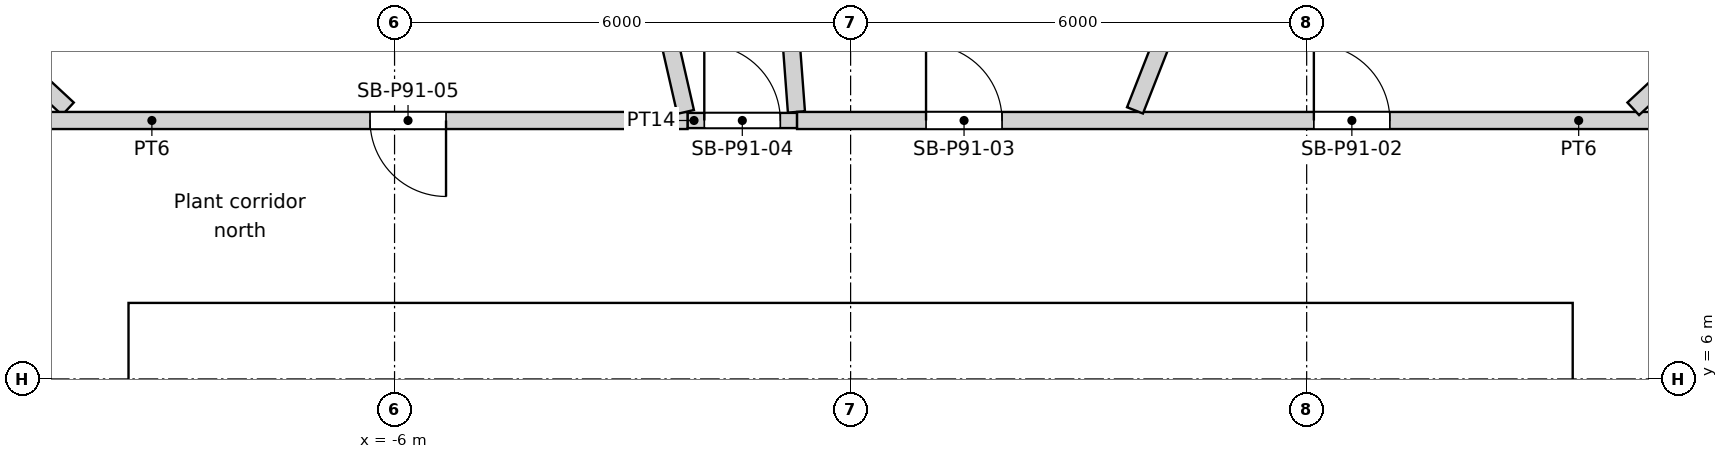
"""IFC4 building model, lengths in metres.
Left out: names, types, materials, properties, quantities, classifications, styles, units other than length and angle.
Written with IfcOpenShell. Run it as: python <this file> out.ifc"""

import sys

from ifc_helpers import new_model, si_unit, direction, frame, frame_2d, origin, place, context, subcontext, project, spatial, rectangle, extrude, element, fill, save


model = new_model("IFC4")
c1 = context("Model", 3, precision=1e-05, world=origin(), true_north=direction((0.0, 1.0)))
c2 = subcontext(c1, "Body", "Model", "MODEL_VIEW")
j1 = project(units=[si_unit("LENGTHUNIT", "METRE"), si_unit("PLANEANGLEUNIT", "RADIAN")], contexts=[c1])
p1 = place(None, origin())
s1 = spatial("IfcSite", under=j1, at=p1, CompositionType="ELEMENT")
p2 = place(p1, origin())
s2 = spatial("IfcBuilding", under=s1, at=p2, CompositionType="ELEMENT")
p3 = place(p2, frame((0.0, 0.0, 358.2)))
s3 = spatial("IfcBuildingStorey", under=s2, at=p3, CompositionType="ELEMENT", Elevation=358.2)
p4 = place(p3, frame((-9.5, 6.7, 0.0), z_axis=(0.0, 0.0, 1.0), x_axis=(1.0, 0.0, 0.0)))
e1 = element("IfcWall", 1, at=p4, inside=s3, PredefinedType="SOLIDWALL", context=c2, shape_type="SweptSolid", body=[
    extrude(rectangle(XDim=19.0, YDim=0.6, at=frame_2d((9.5, 0.0))), origin(), (0.0, 0.0, 1.0), 5.6),
])
p5 = place(p4, frame((5.35, 0.0, 0.0)))
e2 = element("IfcOpeningElement", 2, at=p5, cuts=e1, PredefinedType="OPENING", context=c2, shape_type="SweptSolid", body=[
    extrude(rectangle(XDim=1.7, YDim=2.1, at=frame_2d((0.85, 1.05))), frame((0.0, 0.3, 0.0), z_axis=(0.0, -1.0, 0.0), x_axis=(1.0, 0.0, 0.0)), (0.0, 0.0, 1.0), 0.6),
])
p6 = place(p3, frame((-9.2, -6.4, 0.0), z_axis=(0.0, 0.0, 1.0), x_axis=(0.0, 1.0, 0.0)))
e3 = element("IfcWall", 3, at=p6, inside=s3, PredefinedType="SOLIDWALL", context=c2, shape_type="SweptSolid", body=[
    extrude(rectangle(XDim=12.8, YDim=0.6, at=frame_2d((6.4, 0.0))), origin(), (0.0, 0.0, 1.0), 5.6),
])
p7 = place(p3, frame((9.2, -6.4, 0.0), z_axis=(0.0, 0.0, 1.0), x_axis=(0.0, 1.0, 0.0)))
e4 = element("IfcWall", 4, at=p7, inside=s3, PredefinedType="SOLIDWALL", context=c2, shape_type="SweptSolid", body=[
    extrude(rectangle(XDim=12.8, YDim=0.6, at=frame_2d((6.4, 0.0))), origin(), (0.0, 0.0, 1.0), 5.6),
])
p8 = place(p7, frame((6.4, 0.0, 0.0)))
e5 = element("IfcOpeningElement", 5, at=p8, cuts=e4, PredefinedType="OPENING", context=c2, shape_type="SweptSolid", body=[
    extrude(rectangle(XDim=1.8, YDim=2.1, at=frame_2d((0.9, 1.05))), frame((0.0, 0.3, 0.0), z_axis=(0.0, -1.0, 0.0), x_axis=(1.0, 0.0, 0.0)), (0.0, 0.0, 1.0), 0.6),
])
for number, where, z_axis, x_axis in (
    (6, (-2.25, 3.25, 0.0), (0.0, 0.0, 1.0), (0.0, 1.0, 0.0)),
    (7, (0.55, 3.25, 0.0), (0.0, 0.0, 1.0), (0.0, 1.0, 0.0)),
    (8, (3.35, 3.25, 0.0), (0.0, 0.0, 1.0), (0.0, 1.0, 0.0)),
    (9, (6.15, 3.25, 0.0), (0.0, 0.0, 1.0), (0.0, 1.0, 0.0)),
):
    element("IfcWall", number, at=place(p3, frame(where, z_axis=z_axis, x_axis=x_axis)), inside=s3, PredefinedType="SOLIDWALL", context=c2, shape_type="SweptSolid", body=[
        extrude(rectangle(XDim=3.15, YDim=0.3, at=frame_2d((1.575, 0.0))), origin(), (0.0, 0.0, 1.0), 5.6),
    ])
p9 = place(p3, frame((-12.294, 11.407, 0.0), z_axis=(0.0, 0.0, 1.0), x_axis=(0.733039115951, -0.680186485081, 0.0)))
e10 = element("IfcWall", 10, at=p9, inside=s3, PredefinedType="PARTITIONING", context=c2, shape_type="SweptSolid", body=[
    extrude(rectangle(XDim=2.725, YDim=0.225, at=frame_2d((1.363, 0.0))), origin(), (0.0, 0.0, 1.0), 5.15),
])
p10 = place(p3, frame((-3.732, 16.351, 0.0), z_axis=(0.0, 0.0, 1.0), x_axis=(0.222517634997, -0.974928665142, 0.0)))
e11 = element("IfcWall", 11, at=p10, inside=s3, PredefinedType="PARTITIONING", context=c2, shape_type="SweptSolid", body=[
    extrude(rectangle(XDim=7.014, YDim=0.225, at=frame_2d((3.507, 0.0))), origin(), (0.0, 0.0, 1.0), 5.15),
])
p11 = place(p3, frame((-2.146, 9.4, 0.0), z_axis=(0.0, 0.0, 1.0), x_axis=(-1.0, 0.0, 0.0)))
e12 = element("IfcWall", 12, at=p11, inside=s3, PredefinedType="PARTITIONING", context=c2, shape_type="SweptSolid", body=[
    extrude(rectangle(XDim=9.867, YDim=0.225, at=frame_2d((4.934, 0.0))), origin(), (0.0, 0.0, 1.0), 5.15),
])
p12 = place(p11, frame((3.177, 0.0, 0.0)))
e13 = element("IfcOpeningElement", 13, at=p12, cuts=e12, PredefinedType="OPENING", context=c2, shape_type="SweptSolid", body=[
    extrude(rectangle(XDim=1.0, YDim=2.1, at=frame_2d((0.5, 1.05))), frame((0.0, 0.113, 0.0), z_axis=(0.0, -1.0, 0.0), x_axis=(1.0, 0.0, 0.0)), (0.0, 0.0, 1.0), 0.225),
])
p13 = place(p3, frame((-1.253, 16.725, 0.0), z_axis=(0.0, 0.0, 1.0), x_axis=(0.074737078905, -0.997203273679, 0.0)))
e14 = element("IfcWall", 14, at=p13, inside=s3, PredefinedType="PARTITIONING", context=c2, shape_type="SweptSolid", body=[
    extrude(rectangle(XDim=7.232, YDim=0.225, at=frame_2d((3.616, 0.0))), origin(), (0.0, 0.0, 1.0), 5.15),
])
p14 = place(p3, frame((-0.704, 9.4, 0.0), z_axis=(0.0, 0.0, 1.0), x_axis=(-1.0, 0.0, 0.0)))
e15 = element("IfcWall", 15, at=p14, inside=s3, PredefinedType="PARTITIONING", context=c2, shape_type="SweptSolid", body=[
    extrude(rectangle(XDim=1.441, YDim=0.2, at=frame_2d((0.721, 0.0))), origin(), (0.0, 0.0, 1.0), 5.15),
])
p15 = place(p14, frame((0.22, 0.0, 0.0)))
e16 = element("IfcOpeningElement", 16, at=p15, cuts=e15, PredefinedType="OPENING", context=c2, shape_type="SweptSolid", body=[
    extrude(rectangle(XDim=1.0, YDim=2.1, at=frame_2d((0.5, 1.05))), frame((0.0, 0.1, 0.0), z_axis=(0.0, -1.0, 0.0), x_axis=(1.0, 0.0, 0.0)), (0.0, 0.0, 1.0), 0.2),
])
p16 = place(p3, frame((6.127, 15.612, 0.0), z_axis=(0.0, 0.0, 1.0), x_axis=(-0.365336573435, -0.930875495494, 0.0)))
e17 = element("IfcWall", 17, at=p16, inside=s3, PredefinedType="PARTITIONING", context=c2, shape_type="SweptSolid", body=[
    extrude(rectangle(XDim=6.53, YDim=0.225, at=frame_2d((3.265, 0.0))), origin(), (0.0, 0.0, 1.0), 5.15),
])
p17 = place(p3, frame((12.012, 9.4, 0.0), z_axis=(0.0, 0.0, 1.0), x_axis=(-1.0, 0.0, 0.0)))
e18 = element("IfcWall", 18, at=p17, inside=s3, PredefinedType="PARTITIONING", context=c2, shape_type="SweptSolid", body=[
    extrude(rectangle(XDim=12.717, YDim=0.225, at=frame_2d((6.358, 0.0))), origin(), (0.0, 0.0, 1.0), 5.15),
])
p18 = place(p17, frame((4.918, 0.0, 0.0)))
e19 = element("IfcOpeningElement", 19, at=p18, cuts=e18, PredefinedType="OPENING", context=c2, shape_type="SweptSolid", body=[
    extrude(rectangle(XDim=1.0, YDim=2.1, at=frame_2d((0.5, 1.05))), frame((0.0, 0.113, 0.0), z_axis=(0.0, -1.0, 0.0), x_axis=(1.0, 0.0, 0.0)), (0.0, 0.0, 1.0), 0.225),
])
p19 = place(p17, frame((10.02, 0.0, 0.0)))
e20 = element("IfcOpeningElement", 20, at=p19, cuts=e18, PredefinedType="OPENING", context=c2, shape_type="SweptSolid", body=[
    extrude(rectangle(XDim=1.0, YDim=2.1, at=frame_2d((0.5, 1.05))), frame((0.0, 0.113, 0.0), z_axis=(0.0, -1.0, 0.0), x_axis=(1.0, 0.0, 0.0)), (0.0, 0.0, 1.0), 0.225),
])
p20 = place(p3, frame((12.294, 11.407, 0.0), z_axis=(0.0, 0.0, 1.0), x_axis=(-0.733039115951, -0.680186485081, 0.0)))
e21 = element("IfcWall", 21, at=p20, inside=s3, PredefinedType="PARTITIONING", context=c2, shape_type="SweptSolid", body=[
    extrude(rectangle(XDim=2.725, YDim=0.225, at=frame_2d((1.363, 0.0))), origin(), (0.0, 0.0, 1.0), 5.15),
])
p21 = place(p5, origin())
e22 = element("IfcDoor", 22, at=p21, inside=s3, OperationType="DOUBLE_DOOR_SINGLE_SWING", PredefinedType="DOOR", context=c2, shape_type="SweptSolid", body=[
    extrude(rectangle(XDim=1.7, YDim=2.1, at=frame_2d((0.85, 1.05))), frame((0.0, 0.025, 0.0), z_axis=(0.0, -1.0, 0.0), x_axis=(1.0, 0.0, 0.0)), (0.0, 0.0, 1.0), 0.05),
])
fill(e2, e22)
p22 = place(p18, origin())
e23 = element("IfcDoor", 23, at=p22, inside=s3, OperationType="SINGLE_SWING_LEFT", PredefinedType="DOOR", context=c2, shape_type="SweptSolid", body=[
    extrude(rectangle(XDim=1.0, YDim=2.1, at=frame_2d((0.5, 1.05))), frame((0.0, 0.025, 0.0), z_axis=(0.0, -1.0, 0.0), x_axis=(1.0, 0.0, 0.0)), (0.0, 0.0, 1.0), 0.05),
])
fill(e19, e23)
p23 = place(p19, origin())
e24 = element("IfcDoor", 24, at=p23, inside=s3, OperationType="SINGLE_SWING_LEFT", PredefinedType="DOOR", context=c2, shape_type="SweptSolid", body=[
    extrude(rectangle(XDim=1.0, YDim=2.1, at=frame_2d((0.5, 1.05))), frame((0.0, 0.025, 0.0), z_axis=(0.0, -1.0, 0.0), x_axis=(1.0, 0.0, 0.0)), (0.0, 0.0, 1.0), 0.05),
])
fill(e20, e24)
p24 = place(p15, origin())
e25 = element("IfcDoor", 25, at=p24, inside=s3, OperationType="SINGLE_SWING_LEFT", PredefinedType="DOOR", context=c2, shape_type="SweptSolid", body=[
    extrude(rectangle(XDim=1.0, YDim=2.1, at=frame_2d((0.5, 1.05))), frame((0.0, 0.025, 0.0), z_axis=(0.0, -1.0, 0.0), x_axis=(1.0, 0.0, 0.0)), (0.0, 0.0, 1.0), 0.05),
])
fill(e16, e25)
p25 = place(p12, origin())
e26 = element("IfcDoor", 26, at=p25, inside=s3, OperationType="SINGLE_SWING_LEFT", PredefinedType="DOOR", context=c2, shape_type="SweptSolid", body=[
    extrude(rectangle(XDim=1.0, YDim=2.1, at=frame_2d((0.5, 1.05))), frame((0.0, 0.025, 0.0), z_axis=(0.0, -1.0, 0.0), x_axis=(1.0, 0.0, 0.0)), (0.0, 0.0, 1.0), 0.05),
])
fill(e13, e26)
save(model, sys.argv[1])
